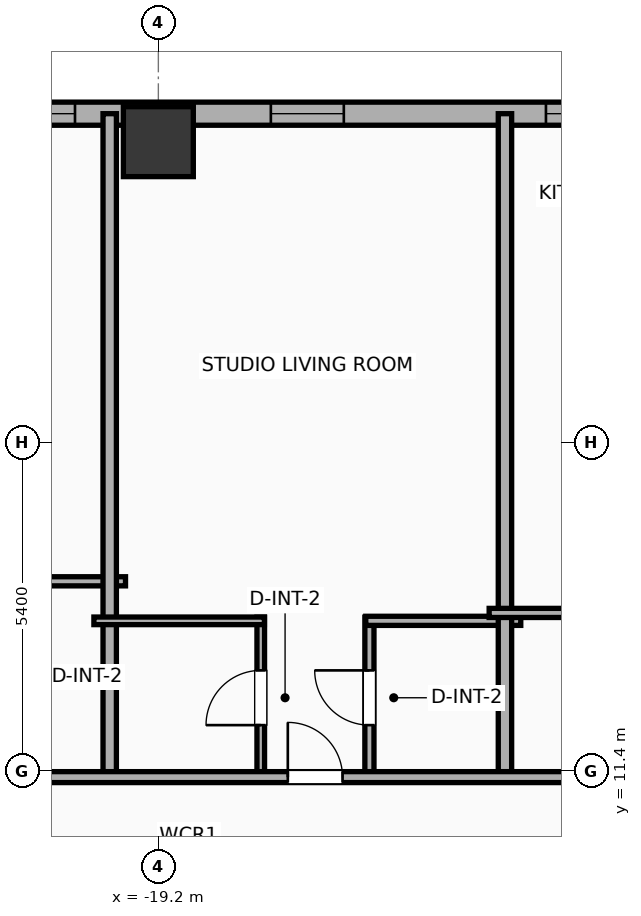
"""IFC4 building model, lengths in metres.
Left out: names, types, materials, properties, quantities, classifications, styles, units other than length and angle.
Written with IfcOpenShell. Run it as: python <this file> out.ifc"""

import sys

from ifc_helpers import new_model, si_unit, direction, frame, frame_2d, origin, origin_2d, place, context, subcontext, project, spatial, rectangle, hollow_rectangle, extrude, element, fill, save


model = new_model("IFC4")
c1 = context("Model", 3, precision=1e-05, world=origin(), true_north=direction((0.0, 1.0)))
c2 = subcontext(c1, "Body", "Model", "MODEL_VIEW")
j1 = project(units=[si_unit("LENGTHUNIT", "METRE"), si_unit("PLANEANGLEUNIT", "RADIAN")], contexts=[c1])
p1 = place(None, origin())
s1 = spatial("IfcSite", under=j1, at=p1, CompositionType="ELEMENT")
p2 = place(p1, origin())
s2 = spatial("IfcBuilding", under=s1, at=p2, CompositionType="ELEMENT")
p3 = place(p2, frame((0.0, 0.0, 49.4)))
s3 = spatial("IfcBuildingStorey", under=s2, at=p3, CompositionType="ELEMENT", Elevation=49.4)
p4 = place(p3, frame((-19.2, 21.75, 0.0), z_axis=(0.0, 0.0, 1.0), x_axis=(1.0, 0.0, 0.0)))
e1 = element("IfcColumn", 1, at=p4, inside=s3, PredefinedType="COLUMN", context=c2, shape_type="SweptSolid", body=[
    extrude(hollow_rectangle(XDim=1.15, YDim=1.15, WallThickness=0.04, at=origin_2d()), origin(), (0.0, 0.0, 1.0), 3.9),
])
p5 = place(p3, frame((-29.581, 22.21, 0.0), z_axis=(0.0, 0.0, 1.0), x_axis=(1.0, 0.0, 0.0)))
e2 = element("IfcWall", 2, at=p5, inside=s3, PredefinedType="ELEMENTEDWALL", context=c2, shape_type="SweptSolid", body=[
    extrude(rectangle(XDim=51.963, YDim=0.38, at=frame_2d((25.981, 0.0))), origin(), (0.0, 0.0, 1.0), 3.65),
])
p6 = place(p5, frame((6.61, 0.0, 0.75)))
e3 = element("IfcOpeningElement", 3, at=p6, cuts=e2, PredefinedType="OPENING", context=c2, shape_type="SweptSolid", body=[
    extrude(rectangle(XDim=2.4, YDim=2.1, at=frame_2d((1.2, 1.05))), frame((0.0, 0.2, 0.0), z_axis=(0.0, -1.0, 0.0), x_axis=(1.0, 0.0, 0.0)), (0.0, 0.0, 1.0), 0.4),
])
p7 = place(p5, frame((26.431, 0.0, 0.75)))
e4 = element("IfcOpeningElement", 4, at=p7, cuts=e2, PredefinedType="OPENING", context=c2, shape_type="SweptSolid", body=[
    extrude(rectangle(XDim=2.4, YDim=2.1, at=frame_2d((1.2, 1.05))), frame((0.0, 0.2, 0.0), z_axis=(0.0, -1.0, 0.0), x_axis=(1.0, 0.0, 0.0)), (0.0, 0.0, 1.0), 0.4),
])
p8 = place(p5, frame((43.752, 0.0, 0.75)))
e5 = element("IfcOpeningElement", 5, at=p8, cuts=e2, PredefinedType="OPENING", context=c2, shape_type="SweptSolid", body=[
    extrude(rectangle(XDim=2.4, YDim=2.1, at=frame_2d((1.2, 1.05))), frame((0.0, 0.2, 0.0), z_axis=(0.0, -1.0, 0.0), x_axis=(1.0, 0.0, 0.0)), (0.0, 0.0, 1.0), 0.4),
])
p9 = place(p5, frame((1.281, 0.0, 0.75)))
e6 = element("IfcOpeningElement", 6, at=p9, cuts=e2, PredefinedType="OPENING", context=c2, shape_type="SweptSolid", body=[
    extrude(rectangle(XDim=1.2, YDim=2.05, at=frame_2d((0.6, 1.025))), frame((0.0, 0.2, 0.0), z_axis=(0.0, -1.0, 0.0), x_axis=(1.0, 0.0, 0.0)), (0.0, 0.0, 1.0), 0.4),
])
p10 = place(p5, frame((3.922, 0.0, 0.75)))
e7 = element("IfcOpeningElement", 7, at=p10, cuts=e2, PredefinedType="OPENING", context=c2, shape_type="SweptSolid", body=[
    extrude(rectangle(XDim=1.2, YDim=2.05, at=frame_2d((0.6, 1.025))), frame((0.0, 0.2, 0.0), z_axis=(0.0, -1.0, 0.0), x_axis=(1.0, 0.0, 0.0)), (0.0, 0.0, 1.0), 0.4),
])
p11 = place(p5, frame((12.231, 0.0, 0.75)))
e8 = element("IfcOpeningElement", 8, at=p11, cuts=e2, PredefinedType="OPENING", context=c2, shape_type="SweptSolid", body=[
    extrude(rectangle(XDim=1.2, YDim=2.05, at=frame_2d((0.6, 1.025))), frame((0.0, 0.2, 0.0), z_axis=(0.0, -1.0, 0.0), x_axis=(1.0, 0.0, 0.0)), (0.0, 0.0, 1.0), 0.4),
])
p12 = place(p5, frame((18.805, 0.0, 0.75)))
e9 = element("IfcOpeningElement", 9, at=p12, cuts=e2, PredefinedType="OPENING", context=c2, shape_type="SweptSolid", body=[
    extrude(rectangle(XDim=1.2, YDim=2.05, at=frame_2d((0.6, 1.025))), frame((0.0, 0.2, 0.0), z_axis=(0.0, -1.0, 0.0), x_axis=(1.0, 0.0, 0.0)), (0.0, 0.0, 1.0), 0.4),
])
p13 = place(p5, frame((16.755, 0.0, 0.75)))
e10 = element("IfcOpeningElement", 10, at=p13, cuts=e2, PredefinedType="OPENING", context=c2, shape_type="SweptSolid", body=[
    extrude(rectangle(XDim=1.2, YDim=2.05, at=frame_2d((0.6, 1.025))), frame((0.0, 0.2, 0.0), z_axis=(0.0, -1.0, 0.0), x_axis=(1.0, 0.0, 0.0)), (0.0, 0.0, 1.0), 0.4),
])
p14 = place(p5, frame((23.776, 0.0, 0.75)))
e11 = element("IfcOpeningElement", 11, at=p14, cuts=e2, PredefinedType="OPENING", context=c2, shape_type="SweptSolid", body=[
    extrude(rectangle(XDim=1.2, YDim=2.05, at=frame_2d((0.6, 1.025))), frame((0.0, 0.2, 0.0), z_axis=(0.0, -1.0, 0.0), x_axis=(1.0, 0.0, 0.0)), (0.0, 0.0, 1.0), 0.4),
])
p15 = place(p5, frame((32.031, 0.0, 0.75)))
e12 = element("IfcOpeningElement", 12, at=p15, cuts=e2, PredefinedType="OPENING", context=c2, shape_type="SweptSolid", body=[
    extrude(rectangle(XDim=0.85, YDim=2.05, at=frame_2d((0.425, 1.025))), frame((0.0, 0.2, 0.0), z_axis=(0.0, -1.0, 0.0), x_axis=(1.0, 0.0, 0.0)), (0.0, 0.0, 1.0), 0.4),
])
p16 = place(p5, frame((34.276, 0.0, 0.75)))
e13 = element("IfcOpeningElement", 13, at=p16, cuts=e2, PredefinedType="OPENING", context=c2, shape_type="SweptSolid", body=[
    extrude(rectangle(XDim=1.2, YDim=2.05, at=frame_2d((0.6, 1.025))), frame((0.0, 0.2, 0.0), z_axis=(0.0, -1.0, 0.0), x_axis=(1.0, 0.0, 0.0)), (0.0, 0.0, 1.0), 0.4),
])
p17 = place(p5, frame((39.231, 0.0, 0.75)))
e14 = element("IfcOpeningElement", 14, at=p17, cuts=e2, PredefinedType="OPENING", context=c2, shape_type="SweptSolid", body=[
    extrude(rectangle(XDim=1.2, YDim=2.05, at=frame_2d((0.6, 1.025))), frame((0.0, 0.2, 0.0), z_axis=(0.0, -1.0, 0.0), x_axis=(1.0, 0.0, 0.0)), (0.0, 0.0, 1.0), 0.4),
])
p18 = place(p5, frame((47.676, 0.0, 0.75)))
e15 = element("IfcOpeningElement", 15, at=p18, cuts=e2, PredefinedType="OPENING", context=c2, shape_type="SweptSolid", body=[
    extrude(rectangle(XDim=1.2, YDim=2.05, at=frame_2d((0.6, 1.025))), frame((0.0, 0.2, 0.0), z_axis=(0.0, -1.0, 0.0), x_axis=(1.0, 0.0, 0.0)), (0.0, 0.0, 1.0), 0.4),
])
p19 = place(p5, frame((49.847, 0.0, 0.75)))
e16 = element("IfcOpeningElement", 16, at=p19, cuts=e2, PredefinedType="OPENING", context=c2, shape_type="SweptSolid", body=[
    extrude(rectangle(XDim=1.2, YDim=2.05, at=frame_2d((0.6, 1.025))), frame((0.0, 0.2, 0.0), z_axis=(0.0, -1.0, 0.0), x_axis=(1.0, 0.0, 0.0)), (0.0, 0.0, 1.0), 0.4),
])
p20 = place(p3, frame((-23.53, 14.52, 0.0), z_axis=(0.0, 0.0, 1.0), x_axis=(1.0, 0.0, 0.0)))
e17 = element("IfcWall", 17, at=p20, inside=s3, PredefinedType="PLUMBINGWALL", context=c2, shape_type="SweptSolid", body=[
    extrude(rectangle(XDim=3.79, YDim=0.15, at=frame_2d((1.895, 0.0))), origin(), (0.0, 0.0, 1.0), 3.65),
])
p21 = place(p3, frame((-20.0, 11.22, 0.0), z_axis=(0.0, 0.0, 1.0), x_axis=(0.0, 1.0, 0.0)))
e18 = element("IfcWall", 18, at=p21, inside=s3, PredefinedType="PARTITIONING", context=c2, shape_type="SweptSolid", body=[
    extrude(rectangle(XDim=10.99, YDim=0.22, at=frame_2d((5.495, 0.0))), origin(), (0.0, 0.0, 1.0), 3.65),
])
p22 = place(p3, frame((-17.516, 11.28, 0.0), z_axis=(0.0, 0.0, 1.0), x_axis=(0.0, 1.0, 0.0)))
e19 = element("IfcWall", 19, at=p22, inside=s3, PredefinedType="PARTITIONING", context=c2, shape_type="SweptSolid", body=[
    extrude(rectangle(XDim=2.65, YDim=0.125, at=frame_2d((1.325, 0.0))), origin(), (0.0, 0.0, 1.0), 3.65),
])
p23 = place(p22, frame((0.875, 0.0, 0.0)))
e20 = element("IfcOpeningElement", 20, at=p23, cuts=e19, PredefinedType="OPENING", context=c2, shape_type="SweptSolid", body=[
    extrude(rectangle(XDim=0.9, YDim=2.05, at=frame_2d((0.45, 1.025))), frame((0.0, 0.073, 0.0), z_axis=(0.0, -1.0, 0.0), x_axis=(1.0, 0.0, 0.0)), (0.0, 0.0, 1.0), 0.145),
])
p24 = place(p3, frame((-15.729, 11.28, 0.0), z_axis=(0.0, 0.0, 1.0), x_axis=(0.0, 1.0, 0.0)))
e21 = element("IfcWall", 21, at=p24, inside=s3, PredefinedType="PLUMBINGWALL", context=c2, shape_type="SweptSolid", body=[
    extrude(rectangle(XDim=2.65, YDim=0.15, at=frame_2d((1.325, 0.0))), origin(), (0.0, 0.0, 1.0), 3.65),
])
p25 = place(p24, frame((0.875, 0.0, 0.0)))
e22 = element("IfcOpeningElement", 22, at=p25, cuts=e21, PredefinedType="OPENING", context=c2, shape_type="SweptSolid", body=[
    extrude(rectangle(XDim=0.9, YDim=2.05, at=frame_2d((0.45, 1.025))), frame((0.0, 0.085, 0.0), z_axis=(0.0, -1.0, 0.0), x_axis=(1.0, 0.0, 0.0)), (0.0, 0.0, 1.0), 0.17),
])
p26 = place(p3, frame((-20.26, 13.87, 0.0), z_axis=(0.0, 0.0, 1.0), x_axis=(1.0, 0.0, 0.0)))
e23 = element("IfcWall", 23, at=p26, inside=s3, PredefinedType="PARTITIONING", context=c2, shape_type="SweptSolid", body=[
    extrude(rectangle(XDim=2.804, YDim=0.125, at=frame_2d((1.402, 0.0))), origin(), (0.0, 0.0, 1.0), 3.65),
])
p27 = place(p3, frame((-15.789, 13.87, 0.0), z_axis=(0.0, 0.0, 1.0), x_axis=(1.0, 0.0, 0.0)))
e24 = element("IfcWall", 24, at=p27, inside=s3, PredefinedType="PLUMBINGWALL", context=c2, shape_type="SweptSolid", body=[
    extrude(rectangle(XDim=2.549, YDim=0.15, at=frame_2d((1.274, 0.0))), origin(), (0.0, 0.0, 1.0), 3.65),
])
p28 = place(p3, frame((-13.5, 11.22, 0.0), z_axis=(0.0, 0.0, 1.0), x_axis=(0.0, 1.0, 0.0)))
e25 = element("IfcWall", 25, at=p28, inside=s3, PredefinedType="PARTITIONING", context=c2, shape_type="SweptSolid", body=[
    extrude(rectangle(XDim=10.99, YDim=0.22, at=frame_2d((5.495, 0.0))), origin(), (0.0, 0.0, 1.0), 3.65),
])
p29 = place(p3, frame((-13.76, 14.0, 0.0), z_axis=(0.0, 0.0, 1.0), x_axis=(1.0, 0.0, 0.0)))
e26 = element("IfcWall", 26, at=p29, inside=s3, PredefinedType="PLUMBINGWALL", context=c2, shape_type="SweptSolid", body=[
    extrude(rectangle(XDim=2.888, YDim=0.15, at=frame_2d((1.444, 0.0))), origin(), (0.0, 0.0, 1.0), 3.65),
])
p30 = place(p3, frame((-33.41, 11.3, 0.0), z_axis=(0.0, 0.0, 1.0), x_axis=(1.0, 0.0, 0.0)))
e27 = element("IfcWall", 27, at=p30, inside=s3, PredefinedType="PARTITIONING", context=c2, shape_type="SweptSolid", body=[
    extrude(rectangle(XDim=59.62, YDim=0.18, at=frame_2d((29.81, 0.0))), origin(), (0.0, 0.0, 1.0), 3.65),
])
p31 = place(p30, frame((3.032, 0.0, 0.0)))
e28 = element("IfcOpeningElement", 28, at=p31, cuts=e27, PredefinedType="OPENING", context=c2, shape_type="SweptSolid", body=[
    extrude(rectangle(XDim=0.9, YDim=2.05, at=frame_2d((0.45, 1.025))), frame((0.0, 0.1, 0.0), z_axis=(0.0, -1.0, 0.0), x_axis=(1.0, 0.0, 0.0)), (0.0, 0.0, 1.0), 0.2),
])
p32 = place(p30, frame((9.769, 0.0, 0.0)))
e29 = element("IfcOpeningElement", 29, at=p32, cuts=e27, PredefinedType="OPENING", context=c2, shape_type="SweptSolid", body=[
    extrude(rectangle(XDim=0.9, YDim=2.05, at=frame_2d((0.45, 1.025))), frame((0.0, 0.1, 0.0), z_axis=(0.0, -1.0, 0.0), x_axis=(1.0, 0.0, 0.0)), (0.0, 0.0, 1.0), 0.2),
])
p33 = place(p30, frame((16.339, 0.0, 0.0)))
e30 = element("IfcOpeningElement", 30, at=p33, cuts=e27, PredefinedType="OPENING", context=c2, shape_type="SweptSolid", body=[
    extrude(rectangle(XDim=0.9, YDim=2.05, at=frame_2d((0.45, 1.025))), frame((0.0, 0.1, 0.0), z_axis=(0.0, -1.0, 0.0), x_axis=(1.0, 0.0, 0.0)), (0.0, 0.0, 1.0), 0.2),
])
p34 = place(p30, frame((23.827, 0.0, 0.0)))
e31 = element("IfcOpeningElement", 31, at=p34, cuts=e27, PredefinedType="OPENING", context=c2, shape_type="SweptSolid", body=[
    extrude(rectangle(XDim=1.15, YDim=2.05, at=frame_2d((0.575, 1.025))), frame((0.0, 0.1, 0.0), z_axis=(0.0, -1.0, 0.0), x_axis=(1.0, 0.0, 0.0)), (0.0, 0.0, 1.0), 0.2),
])
p35 = place(p30, frame((29.622, 0.0, 0.0)))
e32 = element("IfcOpeningElement", 32, at=p35, cuts=e27, PredefinedType="OPENING", context=c2, shape_type="SweptSolid", body=[
    extrude(rectangle(XDim=0.9, YDim=2.05, at=frame_2d((0.45, 1.025))), frame((0.0, 0.1, 0.0), z_axis=(0.0, -1.0, 0.0), x_axis=(1.0, 0.0, 0.0)), (0.0, 0.0, 1.0), 0.2),
])
p36 = place(p30, frame((36.628, 0.0, 0.0)))
e33 = element("IfcOpeningElement", 33, at=p36, cuts=e27, PredefinedType="OPENING", context=c2, shape_type="SweptSolid", body=[
    extrude(rectangle(XDim=0.9, YDim=2.05, at=frame_2d((0.45, 1.025))), frame((0.0, 0.1, 0.0), z_axis=(0.0, -1.0, 0.0), x_axis=(1.0, 0.0, 0.0)), (0.0, 0.0, 1.0), 0.2),
])
p37 = place(p30, frame((43.335, 0.0, 0.0)))
e34 = element("IfcOpeningElement", 34, at=p37, cuts=e27, PredefinedType="OPENING", context=c2, shape_type="SweptSolid", body=[
    extrude(rectangle(XDim=0.9, YDim=2.05, at=frame_2d((0.45, 1.025))), frame((0.0, 0.1, 0.0), z_axis=(0.0, -1.0, 0.0), x_axis=(1.0, 0.0, 0.0)), (0.0, 0.0, 1.0), 0.2),
])
p38 = place(p30, frame((48.307, 0.0, 0.0)))
e35 = element("IfcOpeningElement", 35, at=p38, cuts=e27, PredefinedType="OPENING", context=c2, shape_type="SweptSolid", body=[
    extrude(rectangle(XDim=1.15, YDim=2.05, at=frame_2d((0.575, 1.025))), frame((0.0, 0.1, 0.0), z_axis=(0.0, -1.0, 0.0), x_axis=(1.0, 0.0, 0.0)), (0.0, 0.0, 1.0), 0.2),
])
p39 = place(p30, frame((56.225, 0.0, 0.0)))
e36 = element("IfcOpeningElement", 36, at=p39, cuts=e27, PredefinedType="OPENING", context=c2, shape_type="SweptSolid", body=[
    extrude(rectangle(XDim=0.9, YDim=2.05, at=frame_2d((0.45, 1.025))), frame((0.0, 0.1, 0.0), z_axis=(0.0, -1.0, 0.0), x_axis=(1.0, 0.0, 0.0)), (0.0, 0.0, 1.0), 0.2),
])
p40 = place(p6, origin())
e37 = element("IfcWindow", 37, at=p40, inside=s3, PartitioningType="SINGLE_PANEL", PredefinedType="WINDOW", context=c2, shape_type="SweptSolid", body=[
    extrude(rectangle(XDim=2.4, YDim=2.1, at=frame_2d((1.2, 1.05))), frame((0.0, 0.03, 0.0), z_axis=(0.0, -1.0, 0.0), x_axis=(1.0, 0.0, 0.0)), (0.0, 0.0, 1.0), 0.06),
])
fill(e3, e37)
p41 = place(p11, origin())
e38 = element("IfcWindow", 38, at=p41, inside=s3, PartitioningType="SINGLE_PANEL", PredefinedType="WINDOW", context=c2, shape_type="SweptSolid", body=[
    extrude(rectangle(XDim=1.2, YDim=2.05, at=frame_2d((0.6, 1.025))), frame((0.0, 0.03, 0.0), z_axis=(0.0, -1.0, 0.0), x_axis=(1.0, 0.0, 0.0)), (0.0, 0.0, 1.0), 0.06),
])
fill(e8, e38)
p42 = place(p13, origin())
e39 = element("IfcWindow", 39, at=p42, inside=s3, PartitioningType="SINGLE_PANEL", PredefinedType="WINDOW", context=c2, shape_type="SweptSolid", body=[
    extrude(rectangle(XDim=1.2, YDim=2.05, at=frame_2d((0.6, 1.025))), frame((0.0, 0.03, 0.0), z_axis=(0.0, -1.0, 0.0), x_axis=(1.0, 0.0, 0.0)), (0.0, 0.0, 1.0), 0.06),
])
fill(e10, e39)
p43 = place(p23, origin())
e40 = element("IfcDoor", 40, at=p43, inside=s3, OperationType="SINGLE_SWING_LEFT", PredefinedType="DOOR", context=c2, shape_type="SweptSolid", body=[
    extrude(rectangle(XDim=0.9, YDim=2.05, at=frame_2d((0.45, 1.025))), frame((0.0, 0.025, 0.0), z_axis=(0.0, -1.0, 0.0), x_axis=(1.0, 0.0, 0.0)), (0.0, 0.0, 1.0), 0.05),
])
fill(e20, e40)
p44 = place(p25, origin())
e41 = element("IfcDoor", 41, at=p44, inside=s3, OperationType="SINGLE_SWING_RIGHT", PredefinedType="DOOR", context=c2, shape_type="SweptSolid", body=[
    extrude(rectangle(XDim=0.9, YDim=2.05, at=frame_2d((0.45, 1.025))), frame((0.0, 0.025, 0.0), z_axis=(0.0, -1.0, 0.0), x_axis=(1.0, 0.0, 0.0)), (0.0, 0.0, 1.0), 0.05),
])
fill(e22, e41)
p45 = place(p33, origin())
e42 = element("IfcDoor", 42, at=p45, inside=s3, OperationType="SINGLE_SWING_LEFT", PredefinedType="DOOR", context=c2, shape_type="SweptSolid", body=[
    extrude(rectangle(XDim=0.9, YDim=2.05, at=frame_2d((0.45, 1.025))), frame((0.0, 0.025, 0.0), z_axis=(0.0, -1.0, 0.0), x_axis=(1.0, 0.0, 0.0)), (0.0, 0.0, 1.0), 0.05),
])
fill(e30, e42)
save(model, sys.argv[1])
